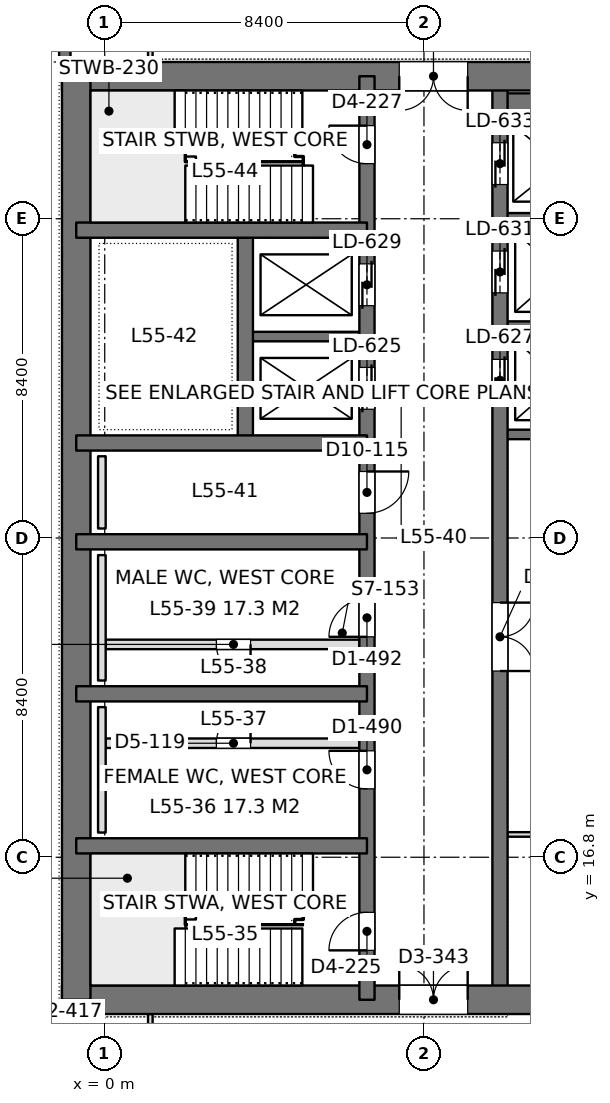
"""IFC4 building model, lengths in metres.
Left out: names, types, materials, properties, quantities, classifications, styles, units other than length and angle.
Written with IfcOpenShell. Run it as: python <this file> out.ifc"""

import sys

from ifc_helpers import new_model, si_unit, direction, frame, frame_2d, origin, place, context, subcontext, project, spatial, rectangle, extrude, element, fill, save


model = new_model("IFC4")
c1 = context("Model", 3, precision=1e-05, world=origin(), true_north=direction((0.0, 1.0)))
c2 = subcontext(c1, "Body", "Model", "MODEL_VIEW")
j1 = project(units=[si_unit("LENGTHUNIT", "METRE"), si_unit("PLANEANGLEUNIT", "RADIAN")], contexts=[c1])
p1 = place(None, origin())
s1 = spatial("IfcSite", under=j1, at=p1, CompositionType="ELEMENT")
p2 = place(p1, origin())
s2 = spatial("IfcBuilding", under=s1, at=p2, CompositionType="ELEMENT")
p3 = place(p2, frame((0.0, 0.0, 240.6)))
s3 = spatial("IfcBuildingStorey", under=s2, at=p3, CompositionType="ELEMENT", Elevation=240.6)
p4 = place(p3, frame((-1.125, 13.05, 0.0), z_axis=(0.0, 0.0, 1.0), x_axis=(1.0, 0.0, 0.0)))
e1 = element("IfcWall", 1, at=p4, inside=s3, PredefinedType="SHEAR", context=c2, shape_type="SweptSolid", body=[
    extrude(rectangle(XDim=17.85, YDim=0.75, at=frame_2d((8.925, 0.0))), origin(), (0.0, 0.0, 1.0), 4.2),
])
p5 = place(p4, frame((8.875, 0.0, 0.0)))
e2 = element("IfcOpeningElement", 2, at=p5, cuts=e1, PredefinedType="OPENING", context=c2, shape_type="SweptSolid", body=[
    extrude(rectangle(XDim=1.8, YDim=2.4, at=frame_2d((0.9, 1.2))), frame((0.0, 0.385, 0.0), z_axis=(0.0, -1.0, 0.0), x_axis=(1.0, 0.0, 0.0)), (0.0, 0.0, 1.0), 0.77),
])
p6 = place(p3, frame((-1.125, 37.35, 0.0), z_axis=(0.0, 0.0, 1.0), x_axis=(1.0, 0.0, 0.0)))
e3 = element("IfcWall", 3, at=p6, inside=s3, PredefinedType="SHEAR", context=c2, shape_type="SweptSolid", body=[
    extrude(rectangle(XDim=17.85, YDim=0.75, at=frame_2d((8.925, 0.0))), origin(), (0.0, 0.0, 1.0), 4.2),
])
p7 = place(p6, frame((8.875, 0.0, 0.0)))
e4 = element("IfcOpeningElement", 4, at=p7, cuts=e3, PredefinedType="OPENING", context=c2, shape_type="SweptSolid", body=[
    extrude(rectangle(XDim=1.8, YDim=2.4, at=frame_2d((0.9, 1.2))), frame((0.0, 0.385, 0.0), z_axis=(0.0, -1.0, 0.0), x_axis=(1.0, 0.0, 0.0)), (0.0, 0.0, 1.0), 0.77),
])
p8 = place(p3, frame((-0.75, 13.05, 0.0), z_axis=(0.0, 0.0, 1.0), x_axis=(0.0, 1.0, 0.0)))
e5 = element("IfcWall", 5, at=p8, inside=s3, PredefinedType="SHEAR", context=c2, shape_type="SweptSolid", body=[
    extrude(rectangle(XDim=24.3, YDim=0.75, at=frame_2d((12.15, 0.0))), origin(), (0.0, 0.0, 1.0), 4.2),
])
p9 = place(p3, frame((6.9, 13.05, 0.0), z_axis=(0.0, 0.0, 1.0), x_axis=(0.0, 1.0, 0.0)))
e6 = element("IfcWall", 6, at=p9, inside=s3, PredefinedType="SHEAR", context=c2, shape_type="SweptSolid", body=[
    extrude(rectangle(XDim=24.3, YDim=0.4, at=frame_2d((12.15, 0.0))), origin(), (0.0, 0.0, 1.0), 4.2),
])
p10 = place(p9, frame((1.3, 0.0, 0.0)))
e7 = element("IfcOpeningElement", 7, at=p10, cuts=e6, PredefinedType="OPENING", context=c2, shape_type="SweptSolid", body=[
    extrude(rectangle(XDim=1.0, YDim=2.2, at=frame_2d((0.5, 1.1))), frame((0.0, 0.21, 0.0), z_axis=(0.0, -1.0, 0.0), x_axis=(1.0, 0.0, 0.0)), (0.0, 0.0, 1.0), 0.42),
])
p11 = place(p9, frame((22.0, 0.0, 0.0)))
e8 = element("IfcOpeningElement", 8, at=p11, cuts=e6, PredefinedType="OPENING", context=c2, shape_type="SweptSolid", body=[
    extrude(rectangle(XDim=1.0, YDim=2.2, at=frame_2d((0.5, 1.1))), frame((0.0, 0.21, 0.0), z_axis=(0.0, -1.0, 0.0), x_axis=(1.0, 0.0, 0.0)), (0.0, 0.0, 1.0), 0.42),
])
p12 = place(p9, frame((5.55, 0.0, 0.0)))
e9 = element("IfcOpeningElement", 9, at=p12, cuts=e6, PredefinedType="OPENING", context=c2, shape_type="SweptSolid", body=[
    extrude(rectangle(XDim=1.0, YDim=2.2, at=frame_2d((0.5, 1.1))), frame((0.0, 0.21, 0.0), z_axis=(0.0, -1.0, 0.0), x_axis=(1.0, 0.0, 0.0)), (0.0, 0.0, 1.0), 0.42),
])
p13 = place(p9, frame((9.55, 0.0, 0.0)))
e10 = element("IfcOpeningElement", 10, at=p13, cuts=e6, PredefinedType="OPENING", context=c2, shape_type="SweptSolid", body=[
    extrude(rectangle(XDim=1.0, YDim=2.2, at=frame_2d((0.5, 1.1))), frame((0.0, 0.21, 0.0), z_axis=(0.0, -1.0, 0.0), x_axis=(1.0, 0.0, 0.0)), (0.0, 0.0, 1.0), 0.42),
])
p14 = place(p9, frame((12.8, 0.0, 0.0)))
e11 = element("IfcOpeningElement", 11, at=p14, cuts=e6, PredefinedType="OPENING", context=c2, shape_type="SweptSolid", body=[
    extrude(rectangle(XDim=1.1, YDim=2.2, at=frame_2d((0.55, 1.1))), frame((0.0, 0.21, 0.0), z_axis=(0.0, -1.0, 0.0), x_axis=(1.0, 0.0, 0.0)), (0.0, 0.0, 1.0), 0.42),
])
p15 = place(p9, frame((15.538, 0.0, 0.0)))
e12 = element("IfcOpeningElement", 12, at=p15, cuts=e6, PredefinedType="OPENING", context=c2, shape_type="SweptSolid", body=[
    extrude(rectangle(XDim=1.1, YDim=2.2, at=frame_2d((0.55, 1.1))), frame((0.0, 0.21, 0.0), z_axis=(0.0, -1.0, 0.0), x_axis=(1.0, 0.0, 0.0)), (0.0, 0.0, 1.0), 0.42),
])
p16 = place(p9, frame((18.262, 0.0, 0.0)))
e13 = element("IfcOpeningElement", 13, at=p16, cuts=e6, PredefinedType="OPENING", context=c2, shape_type="SweptSolid", body=[
    extrude(rectangle(XDim=1.1, YDim=2.2, at=frame_2d((0.55, 1.1))), frame((0.0, 0.21, 0.0), z_axis=(0.0, -1.0, 0.0), x_axis=(1.0, 0.0, 0.0)), (0.0, 0.0, 1.0), 0.42),
])
p17 = place(p3, frame((10.4, 13.05, 0.0), z_axis=(0.0, 0.0, 1.0), x_axis=(0.0, 1.0, 0.0)))
e14 = element("IfcWall", 14, at=p17, inside=s3, PredefinedType="SHEAR", context=c2, shape_type="SweptSolid", body=[
    extrude(rectangle(XDim=24.3, YDim=0.4, at=frame_2d((12.15, 0.0))), origin(), (0.0, 0.0, 1.0), 4.2),
])
p18 = place(p17, frame((15.75, 0.0, 0.0)))
e15 = element("IfcOpeningElement", 15, at=p18, cuts=e14, PredefinedType="OPENING", context=c2, shape_type="SweptSolid", body=[
    extrude(rectangle(XDim=1.1, YDim=2.2, at=frame_2d((0.55, 1.1))), frame((0.0, 0.21, 0.0), z_axis=(0.0, -1.0, 0.0), x_axis=(1.0, 0.0, 0.0)), (0.0, 0.0, 1.0), 0.42),
])
p19 = place(p17, frame((18.6, 0.0, 0.0)))
e16 = element("IfcOpeningElement", 16, at=p19, cuts=e14, PredefinedType="OPENING", context=c2, shape_type="SweptSolid", body=[
    extrude(rectangle(XDim=1.1, YDim=2.2, at=frame_2d((0.55, 1.1))), frame((0.0, 0.21, 0.0), z_axis=(0.0, -1.0, 0.0), x_axis=(1.0, 0.0, 0.0)), (0.0, 0.0, 1.0), 0.42),
])
p20 = place(p17, frame((21.45, 0.0, 0.0)))
e17 = element("IfcOpeningElement", 17, at=p20, cuts=e14, PredefinedType="OPENING", context=c2, shape_type="SweptSolid", body=[
    extrude(rectangle(XDim=1.1, YDim=2.2, at=frame_2d((0.55, 1.1))), frame((0.0, 0.21, 0.0), z_axis=(0.0, -1.0, 0.0), x_axis=(1.0, 0.0, 0.0)), (0.0, 0.0, 1.0), 0.42),
])
p21 = place(p17, frame((8.65, 0.0, 0.0)))
e18 = element("IfcOpeningElement", 18, at=p21, cuts=e14, PredefinedType="OPENING", context=c2, shape_type="SweptSolid", body=[
    extrude(rectangle(XDim=1.8, YDim=2.4, at=frame_2d((0.9, 1.2))), frame((0.0, 0.21, 0.0), z_axis=(0.0, -1.0, 0.0), x_axis=(1.0, 0.0, 0.0)), (0.0, 0.0, 1.0), 0.42),
])
for number, where, z_axis, x_axis in (
    (19, (-0.75, 17.1, 0.0), (0.0, 0.0, 1.0), (1.0, 0.0, 0.0)),
    (20, (-0.75, 21.1, 0.0), (0.0, 0.0, 1.0), (1.0, 0.0, 0.0)),
    (21, (-0.75, 25.1, 0.0), (0.0, 0.0, 1.0), (1.0, 0.0, 0.0)),
    (22, (-0.75, 27.7, 0.0), (0.0, 0.0, 1.0), (1.0, 0.0, 0.0)),
    (23, (-0.75, 33.3, 0.0), (0.0, 0.0, 1.0), (1.0, 0.0, 0.0)),
):
    element("IfcWall", number, at=place(p3, frame(where, z_axis=z_axis, x_axis=x_axis)), inside=s3, PredefinedType="SHEAR", context=c2, shape_type="SweptSolid", body=[
        extrude(rectangle(XDim=7.65, YDim=0.4, at=frame_2d((3.825, 0.0))), origin(), (0.0, 0.0, 1.0), 4.2),
    ])
p22 = place(p3, frame((3.7, 27.7, 0.0), z_axis=(0.0, 0.0, 1.0), x_axis=(0.0, 1.0, 0.0)))
e24 = element("IfcWall", 24, at=p22, inside=s3, PredefinedType="SHEAR", context=c2, shape_type="SweptSolid", body=[
    extrude(rectangle(XDim=5.6, YDim=0.4, at=frame_2d((2.8, 0.0))), origin(), (0.0, 0.0, 1.0), 4.2),
])
p23 = place(p3, frame((3.7, 30.5, 0.0), z_axis=(0.0, 0.0, 1.0), x_axis=(1.0, 0.0, 0.0)))
e25 = element("IfcWall", 25, at=p23, inside=s3, PredefinedType="SHEAR", context=c2, shape_type="SweptSolid", body=[
    extrude(rectangle(XDim=3.2, YDim=0.25, at=frame_2d((1.6, 0.0))), origin(), (0.0, 0.0, 1.0), 4.2),
])
p24 = place(p3, frame((10.4, 27.925, 0.0), z_axis=(0.0, 0.0, 1.0), x_axis=(1.0, 0.0, 0.0)))
e26 = element("IfcWall", 26, at=p24, inside=s3, PredefinedType="SHEAR", context=c2, shape_type="SweptSolid", body=[
    extrude(rectangle(XDim=5.95, YDim=0.25, at=frame_2d((2.975, 0.0))), origin(), (0.0, 0.0, 1.0), 4.2),
])
for number, where, z_axis, x_axis in (
    (27, (10.4, 30.775, 0.0), (0.0, 0.0, 1.0), (1.0, 0.0, 0.0)),
    (28, (10.4, 33.625, 0.0), (0.0, 0.0, 1.0), (1.0, 0.0, 0.0)),
):
    element("IfcWall", number, at=place(p3, frame(where, z_axis=z_axis, x_axis=x_axis)), inside=s3, PredefinedType="SHEAR", context=c2, shape_type="SweptSolid", body=[
        extrude(rectangle(XDim=3.2, YDim=0.25, at=frame_2d((1.6, 0.0))), origin(), (0.0, 0.0, 1.0), 4.2),
    ])
p25 = place(p3, frame((10.4, 36.625, 0.0), z_axis=(0.0, 0.0, 1.0), x_axis=(1.0, 0.0, 0.0)))
e29 = element("IfcWall", 29, at=p25, inside=s3, PredefinedType="SHEAR", context=c2, shape_type="SweptSolid", body=[
    extrude(rectangle(XDim=3.2, YDim=0.55, at=frame_2d((1.6, 0.0))), origin(), (0.0, 0.0, 1.0), 4.2),
])
p26 = place(p3, frame((-1.05, 8.4, 0.0), z_axis=(0.0, 0.0, 1.0), x_axis=(0.0, 1.0, 0.0)))
e30 = element("IfcWall", 30, at=p26, inside=s3, PredefinedType="SOLIDWALL", context=c2, shape_type="SweptSolid", body=[
    extrude(rectangle(XDim=4.275, YDim=0.3, at=frame_2d((2.138, 0.0))), origin(), (0.0, 0.0, 1.0), 4.0),
])
p27 = place(p26, frame((0.938, 0.0, 0.9)))
e31 = element("IfcOpeningElement", 31, at=p27, cuts=e30, PredefinedType="OPENING", context=c2, shape_type="SweptSolid", body=[
    extrude(rectangle(XDim=2.4, YDim=1.9, at=frame_2d((1.2, 0.95))), frame((0.0, 0.16, 0.0), z_axis=(0.0, -1.0, 0.0), x_axis=(1.0, 0.0, 0.0)), (0.0, 0.0, 1.0), 0.32),
])
p28 = place(p3, frame((-1.05, 37.725, 0.0), z_axis=(0.0, 0.0, 1.0), x_axis=(0.0, 1.0, 0.0)))
e32 = element("IfcWall", 32, at=p28, inside=s3, PredefinedType="SOLIDWALL", context=c2, shape_type="SweptSolid", body=[
    extrude(rectangle(XDim=4.275, YDim=0.3, at=frame_2d((2.137, 0.0))), origin(), (0.0, 0.0, 1.0), 4.0),
])
p29 = place(p28, frame((0.938, 0.0, 0.9)))
e33 = element("IfcOpeningElement", 33, at=p29, cuts=e32, PredefinedType="OPENING", context=c2, shape_type="SweptSolid", body=[
    extrude(rectangle(XDim=2.4, YDim=1.9, at=frame_2d((1.2, 0.95))), frame((0.0, 0.16, 0.0), z_axis=(0.0, -1.0, 0.0), x_axis=(1.0, 0.0, 0.0)), (0.0, 0.0, 1.0), 0.32),
])
p30 = place(p3, frame((10.598, 17.4, 0.0), z_axis=(0.0, 0.0, 1.0), x_axis=(1.0, 0.0, 0.0)))
e34 = element("IfcWall", 34, at=p30, inside=s3, PredefinedType="PARTITIONING", context=c2, shape_type="SweptSolid", body=[
    extrude(rectangle(XDim=5.904, YDim=0.12, at=frame_2d((2.952, 0.0))), origin(), (0.0, 0.0, 1.0), 3.3),
])
for number, where, z_axis, x_axis in (
    (35, (1.2, 11.1, 0.0), (0.0, 0.0, 1.0), (0.0, 1.0, 0.0)),
    (36, (1.2, 37.724, 0.0), (0.0, 0.0, 1.0), (0.0, 1.0, 0.0)),
):
    element("IfcWall", number, at=place(p3, frame(where, z_axis=z_axis, x_axis=x_axis)), inside=s3, PredefinedType="PARTITIONING", context=c2, shape_type="SweptSolid", body=[
        extrude(rectangle(XDim=1.576, YDim=0.12, at=frame_2d((0.788, 0.0))), origin(), (0.0, 0.0, 1.0), 4.0),
    ])
p31 = place(p3, frame((0.025, 22.4, 0.0), z_axis=(0.0, 0.0, 1.0), x_axis=(1.0, 0.0, 0.0)))
e37 = element("IfcWall", 37, at=p31, inside=s3, PredefinedType="PARTITIONING", context=c2, shape_type="SweptSolid", body=[
    extrude(rectangle(XDim=6.675, YDim=0.25, at=frame_2d((3.337, 0.0))), origin(), (0.0, 0.0, 1.0), 4.0),
])
p32 = place(p31, frame((2.913, 0.0, 0.0)))
e38 = element("IfcOpeningElement", 38, at=p32, cuts=e37, PredefinedType="OPENING", context=c2, shape_type="SweptSolid", body=[
    extrude(rectangle(XDim=0.9, YDim=2.2, at=frame_2d((0.45, 1.1))), frame((0.0, 0.135, 0.0), z_axis=(0.0, -1.0, 0.0), x_axis=(1.0, 0.0, 0.0)), (0.0, 0.0, 1.0), 0.27),
])
p33 = place(p3, frame((0.025, 19.8, 0.0), z_axis=(0.0, 0.0, 1.0), x_axis=(1.0, 0.0, 0.0)))
e39 = element("IfcWall", 39, at=p33, inside=s3, PredefinedType="PARTITIONING", context=c2, shape_type="SweptSolid", body=[
    extrude(rectangle(XDim=6.675, YDim=0.25, at=frame_2d((3.337, 0.0))), origin(), (0.0, 0.0, 1.0), 4.0),
])
p34 = place(p33, frame((2.913, 0.0, 0.0)))
e40 = element("IfcOpeningElement", 40, at=p34, cuts=e39, PredefinedType="OPENING", context=c2, shape_type="SweptSolid", body=[
    extrude(rectangle(XDim=0.9, YDim=2.2, at=frame_2d((0.45, 1.1))), frame((0.0, 0.135, 0.0), z_axis=(0.0, -1.0, 0.0), x_axis=(1.0, 0.0, 0.0)), (0.0, 0.0, 1.0), 0.27),
])
for number, where, z_axis, x_axis in (
    (41, (-0.075, 17.45, 0.0), (0.0, 0.0, 1.0), (0.0, 1.0, 0.0)),
    (42, (-0.075, 21.45, 0.0), (0.0, 0.0, 1.0), (0.0, 1.0, 0.0)),
):
    element("IfcWall", number, at=place(p3, frame(where, z_axis=z_axis, x_axis=x_axis)), inside=s3, PredefinedType="PLUMBINGWALL", context=c2, shape_type="SweptSolid", body=[
        extrude(rectangle(XDim=3.3, YDim=0.2, at=frame_2d((1.65, 0.0))), origin(), (0.0, 0.0, 1.0), 1.2),
    ])
p35 = place(p3, frame((-0.075, 25.45, 0.0), z_axis=(0.0, 0.0, 1.0), x_axis=(0.0, 1.0, 0.0)))
e43 = element("IfcWall", 43, at=p35, inside=s3, PredefinedType="PLUMBINGWALL", context=c2, shape_type="SweptSolid", body=[
    extrude(rectangle(XDim=1.9, YDim=0.2, at=frame_2d((0.95, 0.0))), origin(), (0.0, 0.0, 1.0), 1.2),
])
p36 = place(p5, origin())
e44 = element("IfcDoor", 44, at=p36, inside=s3, OperationType="DOUBLE_DOOR_SINGLE_SWING", PredefinedType="DOOR", context=c2, shape_type="SweptSolid", body=[
    extrude(rectangle(XDim=1.8, YDim=2.4, at=frame_2d((0.9, 1.2))), frame((0.0, 0.025, 0.0), z_axis=(0.0, -1.0, 0.0), x_axis=(1.0, 0.0, 0.0)), (0.0, 0.0, 1.0), 0.05),
])
fill(e2, e44)
p37 = place(p7, frame((1.8, 0.0, 0.0), z_axis=(0.0, 0.0, 1.0), x_axis=(-1.0, 0.0, 0.0)))
e45 = element("IfcDoor", 45, at=p37, inside=s3, OperationType="DOUBLE_DOOR_SINGLE_SWING", PredefinedType="DOOR", context=c2, shape_type="SweptSolid", body=[
    extrude(rectangle(XDim=1.8, YDim=2.4, at=frame_2d((0.9, 1.2))), frame((0.0, 0.025, 0.0), z_axis=(0.0, -1.0, 0.0), x_axis=(1.0, 0.0, 0.0)), (0.0, 0.0, 1.0), 0.05),
])
fill(e4, e45)
p38 = place(p10, origin())
e46 = element("IfcDoor", 46, at=p38, inside=s3, OperationType="SINGLE_SWING_LEFT", PredefinedType="DOOR", context=c2, shape_type="SweptSolid", body=[
    extrude(rectangle(XDim=1.0, YDim=2.2, at=frame_2d((0.5, 1.1))), frame((0.0, 0.025, 0.0), z_axis=(0.0, -1.0, 0.0), x_axis=(1.0, 0.0, 0.0)), (0.0, 0.0, 1.0), 0.05),
])
fill(e7, e46)
p39 = place(p11, origin())
e47 = element("IfcDoor", 47, at=p39, inside=s3, OperationType="SINGLE_SWING_RIGHT", PredefinedType="DOOR", context=c2, shape_type="SweptSolid", body=[
    extrude(rectangle(XDim=1.0, YDim=2.2, at=frame_2d((0.5, 1.1))), frame((0.0, 0.025, 0.0), z_axis=(0.0, -1.0, 0.0), x_axis=(1.0, 0.0, 0.0)), (0.0, 0.0, 1.0), 0.05),
])
fill(e8, e47)
p40 = place(p12, origin())
e48 = element("IfcDoor", 48, at=p40, inside=s3, OperationType="SINGLE_SWING_RIGHT", PredefinedType="DOOR", context=c2, shape_type="SweptSolid", body=[
    extrude(rectangle(XDim=1.0, YDim=2.2, at=frame_2d((0.5, 1.1))), frame((0.0, 0.025, 0.0), z_axis=(0.0, -1.0, 0.0), x_axis=(1.0, 0.0, 0.0)), (0.0, 0.0, 1.0), 0.05),
])
fill(e9, e48)
p41 = place(p13, origin())
e49 = element("IfcDoor", 49, at=p41, inside=s3, OperationType="SINGLE_SWING_LEFT", PredefinedType="DOOR", context=c2, shape_type="SweptSolid", body=[
    extrude(rectangle(XDim=1.0, YDim=2.2, at=frame_2d((0.5, 1.1))), frame((0.0, 0.025, 0.0), z_axis=(0.0, -1.0, 0.0), x_axis=(1.0, 0.0, 0.0)), (0.0, 0.0, 1.0), 0.05),
])
fill(e10, e49)
p42 = place(p14, frame((1.1, 0.0, 0.0), z_axis=(0.0, 0.0, 1.0), x_axis=(-1.0, 0.0, 0.0)))
e50 = element("IfcDoor", 50, at=p42, inside=s3, OperationType="SINGLE_SWING_LEFT", PredefinedType="DOOR", context=c2, shape_type="SweptSolid", body=[
    extrude(rectangle(XDim=1.1, YDim=2.2, at=frame_2d((0.55, 1.1))), frame((0.0, 0.025, 0.0), z_axis=(0.0, -1.0, 0.0), x_axis=(1.0, 0.0, 0.0)), (0.0, 0.0, 1.0), 0.05),
])
fill(e11, e50)
p43 = place(p18, origin())
e51 = element("IfcDoor", 51, at=p43, inside=s3, OperationType="DOUBLE_DOOR_SLIDING", PredefinedType="DOOR", context=c2, shape_type="SweptSolid", body=[
    extrude(rectangle(XDim=1.1, YDim=2.2, at=frame_2d((0.55, 1.1))), frame((0.0, 0.025, 0.0), z_axis=(0.0, -1.0, 0.0), x_axis=(1.0, 0.0, 0.0)), (0.0, 0.0, 1.0), 0.05),
])
fill(e15, e51)
p44 = place(p19, origin())
e52 = element("IfcDoor", 52, at=p44, inside=s3, OperationType="DOUBLE_DOOR_SLIDING", PredefinedType="DOOR", context=c2, shape_type="SweptSolid", body=[
    extrude(rectangle(XDim=1.1, YDim=2.2, at=frame_2d((0.55, 1.1))), frame((0.0, 0.025, 0.0), z_axis=(0.0, -1.0, 0.0), x_axis=(1.0, 0.0, 0.0)), (0.0, 0.0, 1.0), 0.05),
])
fill(e16, e52)
p45 = place(p20, origin())
e53 = element("IfcDoor", 53, at=p45, inside=s3, OperationType="DOUBLE_DOOR_SLIDING", PredefinedType="DOOR", context=c2, shape_type="SweptSolid", body=[
    extrude(rectangle(XDim=1.1, YDim=2.2, at=frame_2d((0.55, 1.1))), frame((0.0, 0.025, 0.0), z_axis=(0.0, -1.0, 0.0), x_axis=(1.0, 0.0, 0.0)), (0.0, 0.0, 1.0), 0.05),
])
fill(e17, e53)
p46 = place(p15, origin())
e54 = element("IfcDoor", 54, at=p46, inside=s3, OperationType="DOUBLE_DOOR_SLIDING", PredefinedType="DOOR", context=c2, shape_type="SweptSolid", body=[
    extrude(rectangle(XDim=1.1, YDim=2.2, at=frame_2d((0.55, 1.1))), frame((0.0, 0.025, 0.0), z_axis=(0.0, -1.0, 0.0), x_axis=(1.0, 0.0, 0.0)), (0.0, 0.0, 1.0), 0.05),
])
fill(e12, e54)
p47 = place(p16, origin())
e55 = element("IfcDoor", 55, at=p47, inside=s3, OperationType="DOUBLE_DOOR_SLIDING", PredefinedType="DOOR", context=c2, shape_type="SweptSolid", body=[
    extrude(rectangle(XDim=1.1, YDim=2.2, at=frame_2d((0.55, 1.1))), frame((0.0, 0.025, 0.0), z_axis=(0.0, -1.0, 0.0), x_axis=(1.0, 0.0, 0.0)), (0.0, 0.0, 1.0), 0.05),
])
fill(e13, e55)
p48 = place(p21, frame((1.8, 0.0, 0.0), z_axis=(0.0, 0.0, 1.0), x_axis=(-1.0, 0.0, 0.0)))
e56 = element("IfcDoor", 56, at=p48, inside=s3, OperationType="DOUBLE_DOOR_SINGLE_SWING", PredefinedType="DOOR", context=c2, shape_type="SweptSolid", body=[
    extrude(rectangle(XDim=1.8, YDim=2.4, at=frame_2d((0.9, 1.2))), frame((0.0, 0.025, 0.0), z_axis=(0.0, -1.0, 0.0), x_axis=(1.0, 0.0, 0.0)), (0.0, 0.0, 1.0), 0.05),
])
fill(e18, e56)
p49 = place(p32, frame((0.9, 0.0, 0.0), z_axis=(0.0, 0.0, 1.0), x_axis=(-1.0, 0.0, 0.0)))
e57 = element("IfcDoor", 57, at=p49, inside=s3, OperationType="SINGLE_SWING_LEFT", PredefinedType="DOOR", context=c2, shape_type="SweptSolid", body=[
    extrude(rectangle(XDim=0.9, YDim=2.2, at=frame_2d((0.45, 1.1))), frame((0.0, 0.025, 0.0), z_axis=(0.0, -1.0, 0.0), x_axis=(1.0, 0.0, 0.0)), (0.0, 0.0, 1.0), 0.05),
])
fill(e38, e57)
p50 = place(p34, origin())
e58 = element("IfcDoor", 58, at=p50, inside=s3, OperationType="SINGLE_SWING_RIGHT", PredefinedType="DOOR", context=c2, shape_type="SweptSolid", body=[
    extrude(rectangle(XDim=0.9, YDim=2.2, at=frame_2d((0.45, 1.1))), frame((0.0, 0.025, 0.0), z_axis=(0.0, -1.0, 0.0), x_axis=(1.0, 0.0, 0.0)), (0.0, 0.0, 1.0), 0.05),
])
fill(e40, e58)
save(model, sys.argv[1])
